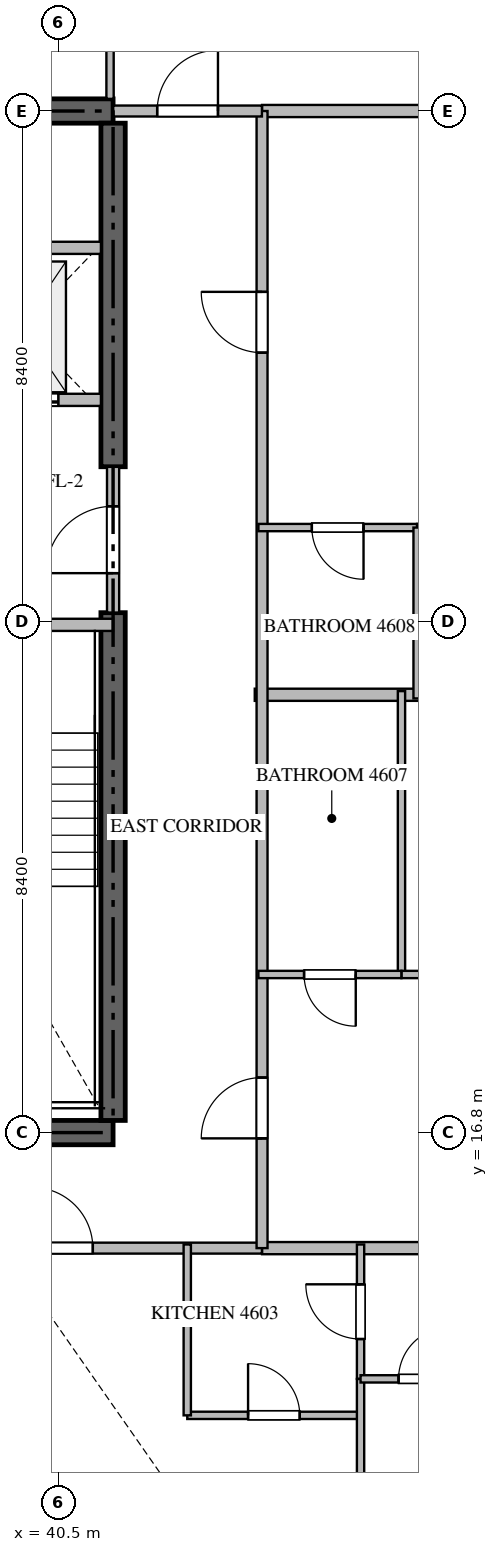
"""IFC4 building model, lengths in metres.
Left out: names, types, materials, properties, quantities, classifications, styles, units other than length and angle.
Written with IfcOpenShell. Run it as: python <this file> out.ifc"""

import sys

from ifc_helpers import new_model, si_unit, direction, frame, frame_2d, origin, place, context, subcontext, project, spatial, rectangle, extrude, source, transform, mapped, element, fill, save


model = new_model("IFC4")
c1 = context("Model", 3, precision=1e-05, world=origin(), true_north=direction((0.0, 1.0)))
c2 = subcontext(c1, "Body", "Model", "MODEL_VIEW")
j1 = project(units=[si_unit("LENGTHUNIT", "METRE"), si_unit("PLANEANGLEUNIT", "RADIAN")], contexts=[c1])
p1 = place(None, origin())
s1 = spatial("IfcSite", under=j1, at=p1, CompositionType="ELEMENT")
p2 = place(p1, origin())
s2 = spatial("IfcBuilding", under=s1, at=p2, CompositionType="ELEMENT")
p3 = place(p2, frame((0.0, 0.0, 183.9)))
s3 = spatial("IfcBuildingStorey", under=s2, at=p3, CompositionType="ELEMENT", Elevation=183.9)
for number, where, z_axis, x_axis in (
    (1, (23.4, 16.8, -0.26), (0.0, 0.0, 1.0), (1.0, 0.0, 0.0)),
    (2, (41.4, 33.6, -0.26), (0.0, 0.0, 1.0), (-1.0, 0.0, 0.0)),
):
    element("IfcWall", number, at=place(p3, frame(where, z_axis=z_axis, x_axis=x_axis)), inside=s3, PredefinedType="SHEAR", context=c2, shape_type="SweptSolid", body=[
        extrude(rectangle(XDim=18.0, YDim=0.4, at=frame_2d((9.0, 0.0))), origin(), (0.0, 0.0, 1.0), 3.748),
    ])
p4 = place(p3, frame((41.4, 17.0, -0.26), z_axis=(0.0, 0.0, 1.0), x_axis=(0.0, 1.0, 0.0)))
e3 = element("IfcWall", 3, at=p4, inside=s3, PredefinedType="SHEAR", context=c2, shape_type="SweptSolid", body=[
    extrude(rectangle(XDim=8.35, YDim=0.4, at=frame_2d((4.175, 0.0))), origin(), (0.0, 0.0, 1.0), 3.748),
])
p5 = place(p3, frame((41.4, 27.75, -0.26), z_axis=(0.0, 0.0, 1.0), x_axis=(0.0, 1.0, 0.0)))
e4 = element("IfcWall", 4, at=p5, inside=s3, PredefinedType="SHEAR", context=c2, shape_type="SweptSolid", body=[
    extrude(rectangle(XDim=5.65, YDim=0.4, at=frame_2d((2.825, 0.0))), origin(), (0.0, 0.0, 1.0), 3.748),
])
p6 = place(p3, frame((36.95, 25.15, 0.0), z_axis=(0.0, 0.0, 1.0), x_axis=(1.0, 0.0, 0.0)))
e5 = element("IfcWall", 5, at=p6, inside=s3, PredefinedType="STANDARD", context=c2, shape_type="SweptSolid", body=[
    extrude(rectangle(XDim=4.45, YDim=0.2, at=frame_2d((2.225, 0.0))), origin(), (0.0, 0.0, 1.0), 3.49),
])
p7 = place(p6, frame((1.65, 0.0, 0.0)))
e6 = element("IfcOpeningElement", 6, at=p7, cuts=e5, PredefinedType="OPENING", context=c2, shape_type="SweptSolid", body=[
    extrude(rectangle(XDim=1.1, YDim=2.15, at=frame_2d((0.55, 1.075))), frame((0.0, 0.11, 0.0), z_axis=(0.0, -1.0, 0.0), x_axis=(1.0, 0.0, 0.0)), (0.0, 0.0, 1.0), 0.22),
])
p8 = place(p3, frame((38.75, 28.85, 0.0), z_axis=(0.0, 0.0, 1.0), x_axis=(1.0, 0.0, 0.0)))
e7 = element("IfcWall", 7, at=p8, inside=s3, PredefinedType="STANDARD", context=c2, shape_type="SweptSolid", body=[
    extrude(rectangle(XDim=2.45, YDim=0.2, at=frame_2d((1.225, 0.0))), origin(), (0.0, 0.0, 1.0), 3.49),
])
p9 = place(p8, frame((0.55, 0.0, 0.0)))
e8 = element("IfcOpeningElement", 8, at=p9, cuts=e7, PredefinedType="OPENING", context=c2, shape_type="SweptSolid", body=[
    extrude(rectangle(XDim=1.2, YDim=2.2, at=frame_2d((0.6, 1.1))), frame((0.0, 0.11, 0.0), z_axis=(0.0, -1.0, 0.0), x_axis=(1.0, 0.0, 0.0)), (0.0, 0.0, 1.0), 0.22),
])
p10 = place(p3, frame((38.75, 31.35, 0.0), z_axis=(0.0, 0.0, 1.0), x_axis=(1.0, 0.0, 0.0)))
e9 = element("IfcWall", 9, at=p10, inside=s3, PredefinedType="STANDARD", context=c2, shape_type="SweptSolid", body=[
    extrude(rectangle(XDim=2.45, YDim=0.2, at=frame_2d((1.225, 0.0))), origin(), (0.0, 0.0, 1.0), 3.49),
])
p11 = place(p3, frame((41.4, 25.352, 0.0), z_axis=(0.0, 0.0, 1.0), x_axis=(0.0, 1.0, 0.0)))
e10 = element("IfcWall", 10, at=p11, inside=s3, PredefinedType="STANDARD", context=c2, shape_type="SweptSolid", body=[
    extrude(rectangle(XDim=2.396, YDim=0.2, at=frame_2d((1.198, 0.0))), origin(), (0.0, 0.0, 1.0), 3.49),
])
p12 = place(p11, frame((0.648, 0.0, 0.0)))
e11 = element("IfcOpeningElement", 11, at=p12, cuts=e10, PredefinedType="OPENING", context=c2, shape_type="SweptSolid", body=[
    extrude(rectangle(XDim=1.1, YDim=2.15, at=frame_2d((0.55, 1.075))), frame((0.0, 0.11, 0.0), z_axis=(0.0, -1.0, 0.0), x_axis=(1.0, 0.0, 0.0)), (0.0, 0.0, 1.0), 0.22),
])
p13 = place(p3, frame((43.73, 24.0, 0.0), z_axis=(0.0, 0.0, 1.0), x_axis=(1.0, 0.0, 0.0)))
e12 = element("IfcWall", 12, at=p13, inside=s3, PredefinedType="PARTITIONING", context=c2, shape_type="SweptSolid", body=[
    extrude(rectangle(XDim=13.188, YDim=0.2, at=frame_2d((6.594, 0.0))), origin(), (0.0, 0.0, 1.0), 3.49),
])
for number, where, z_axis, x_axis in (
    (13, (43.85, 14.9, 0.0), (0.0, 0.0, 1.0), (1.0, 0.0, 0.0)),
    (14, (43.85, 33.6, 0.0), (0.0, 0.0, 1.0), (1.0, 0.0, 0.0)),
):
    element("IfcWall", number, at=place(p3, frame(where, z_axis=z_axis, x_axis=x_axis)), inside=s3, PredefinedType="PARTITIONING", context=c2, shape_type="SweptSolid", body=[
        extrude(rectangle(XDim=13.068, YDim=0.2, at=frame_2d((6.534, 0.0))), origin(), (0.0, 0.0, 1.0), 3.49),
    ])
p14 = place(p3, frame((20.952, 14.9, 0.0), z_axis=(0.0, 0.0, 1.0), x_axis=(1.0, 0.0, 0.0)))
e15 = element("IfcWall", 15, at=p14, inside=s3, PredefinedType="PARTITIONING", context=c2, shape_type="SweptSolid", body=[
    extrude(rectangle(XDim=22.896, YDim=0.18, at=frame_2d((11.448, 0.0))), origin(), (0.0, 0.0, 1.0), 3.49),
])
p15 = place(p14, frame((2.781, 0.0, 0.0)))
e16 = element("IfcOpeningElement", 16, at=p15, cuts=e15, PredefinedType="OPENING", context=c2, shape_type="SweptSolid", body=[
    extrude(rectangle(XDim=1.0, YDim=2.15, at=frame_2d((0.5, 1.075))), frame((0.0, 0.1, 0.0), z_axis=(0.0, -1.0, 0.0), x_axis=(1.0, 0.0, 0.0)), (0.0, 0.0, 1.0), 0.2),
])
p16 = place(p14, frame((14.736, 0.0, 0.0)))
e17 = element("IfcOpeningElement", 17, at=p16, cuts=e15, PredefinedType="OPENING", context=c2, shape_type="SweptSolid", body=[
    extrude(rectangle(XDim=1.0, YDim=2.15, at=frame_2d((0.5, 1.075))), frame((0.0, 0.1, 0.0), z_axis=(0.0, -1.0, 0.0), x_axis=(1.0, 0.0, 0.0)), (0.0, 0.0, 1.0), 0.2),
])
p17 = place(p14, frame((19.115, 0.0, 0.0)))
e18 = element("IfcOpeningElement", 18, at=p17, cuts=e15, PredefinedType="OPENING", context=c2, shape_type="SweptSolid", body=[
    extrude(rectangle(XDim=1.0, YDim=2.15, at=frame_2d((0.5, 1.075))), frame((0.0, 0.1, 0.0), z_axis=(0.0, -1.0, 0.0), x_axis=(1.0, 0.0, 0.0)), (0.0, 0.0, 1.0), 0.2),
])
p18 = place(p3, frame((43.85, 14.9, 0.0), z_axis=(0.0, 0.0, 1.0), x_axis=(0.0, 1.0, 0.0)))
e19 = element("IfcWall", 19, at=p18, inside=s3, PredefinedType="PARTITIONING", context=c2, shape_type="SweptSolid", body=[
    extrude(rectangle(XDim=18.7, YDim=0.18, at=frame_2d((9.35, 0.0))), origin(), (0.0, 0.0, 1.0), 3.49),
])
p19 = place(p18, frame((1.805, 0.0, 0.0)))
e20 = element("IfcOpeningElement", 20, at=p19, cuts=e19, PredefinedType="OPENING", context=c2, shape_type="SweptSolid", body=[
    extrude(rectangle(XDim=1.0, YDim=2.15, at=frame_2d((0.5, 1.075))), frame((0.0, 0.1, 0.0), z_axis=(0.0, -1.0, 0.0), x_axis=(1.0, 0.0, 0.0)), (0.0, 0.0, 1.0), 0.2),
])
p20 = place(p18, frame((14.726, 0.0, 0.0)))
e21 = element("IfcOpeningElement", 21, at=p20, cuts=e19, PredefinedType="OPENING", context=c2, shape_type="SweptSolid", body=[
    extrude(rectangle(XDim=1.0, YDim=2.15, at=frame_2d((0.5, 1.075))), frame((0.0, 0.1, 0.0), z_axis=(0.0, -1.0, 0.0), x_axis=(1.0, 0.0, 0.0)), (0.0, 0.0, 1.0), 0.2),
])
p21 = place(p3, frame((41.402, 33.6, 0.0), z_axis=(0.0, 0.0, 1.0), x_axis=(1.0, 0.0, 0.0)))
e22 = element("IfcWall", 22, at=p21, inside=s3, PredefinedType="PARTITIONING", context=c2, shape_type="SweptSolid", body=[
    extrude(rectangle(XDim=2.446, YDim=0.18, at=frame_2d((1.223, 0.0))), origin(), (0.0, 0.0, 1.0), 3.49),
])
p22 = place(p21, frame((0.723, 0.0, 0.0)))
e23 = element("IfcOpeningElement", 23, at=p22, cuts=e22, PredefinedType="OPENING", context=c2, shape_type="SweptSolid", body=[
    extrude(rectangle(XDim=1.0, YDim=2.15, at=frame_2d((0.5, 1.075))), frame((0.0, 0.1, 0.0), z_axis=(0.0, -1.0, 0.0), x_axis=(1.0, 0.0, 0.0)), (0.0, 0.0, 1.0), 0.2),
])
p23 = place(p3, frame((42.62, 12.15, 0.0), z_axis=(0.0, 0.0, 1.0), x_axis=(1.0, 0.0, 0.0)))
e24 = element("IfcWall", 24, at=p23, inside=s3, PredefinedType="PARTITIONING", context=c2, shape_type="SweptSolid", body=[
    extrude(rectangle(XDim=2.85, YDim=0.12, at=frame_2d((1.425, 0.0))), origin(), (0.0, 0.0, 1.0), 3.49),
])
p24 = place(p23, frame((1.0, 0.0, 0.0)))
e25 = element("IfcOpeningElement", 25, at=p24, cuts=e24, PredefinedType="OPENING", context=c2, shape_type="SweptSolid", body=[
    extrude(rectangle(XDim=0.85, YDim=2.1, at=frame_2d((0.425, 1.05))), frame((0.0, 0.07, 0.0), z_axis=(0.0, -1.0, 0.0), x_axis=(1.0, 0.0, 0.0)), (0.0, 0.0, 1.0), 0.14),
])
p25 = place(p3, frame((42.62, 12.15, 0.0), z_axis=(0.0, 0.0, 1.0), x_axis=(0.0, 1.0, 0.0)))
e26 = element("IfcWall", 26, at=p25, inside=s3, PredefinedType="PARTITIONING", context=c2, shape_type="SweptSolid", body=[
    extrude(rectangle(XDim=2.81, YDim=0.12, at=frame_2d((1.405, 0.0))), origin(), (0.0, 0.0, 1.0), 3.49),
])
p26 = place(p3, frame((45.47, 12.75, 0.0), z_axis=(0.0, 0.0, 1.0), x_axis=(0.0, 1.0, 0.0)))
e27 = element("IfcWall", 27, at=p26, inside=s3, PredefinedType="PARTITIONING", context=c2, shape_type="SweptSolid", body=[
    extrude(rectangle(XDim=2.21, YDim=0.12, at=frame_2d((1.105, 0.0))), origin(), (0.0, 0.0, 1.0), 3.49),
])
p27 = place(p26, frame((0.655, 0.0, 0.0)))
e28 = element("IfcOpeningElement", 28, at=p27, cuts=e27, PredefinedType="OPENING", context=c2, shape_type="SweptSolid", body=[
    extrude(rectangle(XDim=0.9, YDim=2.1, at=frame_2d((0.45, 1.05))), frame((0.0, 0.07, 0.0), z_axis=(0.0, -1.0, 0.0), x_axis=(1.0, 0.0, 0.0)), (0.0, 0.0, 1.0), 0.14),
])
p28 = place(p3, frame((45.47, 6.795, 0.0), z_axis=(0.0, 0.0, 1.0), x_axis=(0.0, 1.0, 0.0)))
e29 = element("IfcWall", 29, at=p28, inside=s3, PredefinedType="PARTITIONING", context=c2, shape_type="SweptSolid", body=[
    extrude(rectangle(XDim=5.953, YDim=0.12, at=frame_2d((2.977, 0.0))), origin(), (0.0, 0.0, 1.0), 3.49),
])
p29 = place(p3, frame((45.47, 12.75, 0.0), z_axis=(0.0, 0.0, 1.0), x_axis=(1.0, 0.0, 0.0)))
e30 = element("IfcWall", 30, at=p29, inside=s3, PredefinedType="PARTITIONING", context=c2, shape_type="SweptSolid", body=[
    extrude(rectangle(XDim=2.1, YDim=0.12, at=frame_2d((1.05, 0.0))), origin(), (0.0, 0.0, 1.0), 3.49),
])
p30 = place(p29, frame((0.625, 0.0, 0.0)))
e31 = element("IfcOpeningElement", 31, at=p30, cuts=e30, PredefinedType="OPENING", context=c2, shape_type="SweptSolid", body=[
    extrude(rectangle(XDim=0.85, YDim=2.1, at=frame_2d((0.425, 1.05))), frame((0.0, 0.07, 0.0), z_axis=(0.0, -1.0, 0.0), x_axis=(1.0, 0.0, 0.0)), (0.0, 0.0, 1.0), 0.14),
])
p31 = place(p3, frame((41.35, 36.35, 0.0), z_axis=(0.0, 0.0, 1.0), x_axis=(0.0, -1.0, 0.0)))
e32 = element("IfcWall", 32, at=p31, inside=s3, PredefinedType="PARTITIONING", context=c2, shape_type="SweptSolid", body=[
    extrude(rectangle(XDim=2.55, YDim=0.12, at=frame_2d((1.275, 0.0))), origin(), (0.0, 0.0, 1.0), 3.49),
])
p32 = place(p3, frame((46.143, 19.4, 0.0), z_axis=(0.0, 0.0, 1.0), x_axis=(0.0, 1.0, 0.0)))
e33 = element("IfcWall", 33, at=p32, inside=s3, PredefinedType="PARTITIONING", context=c2, shape_type="SweptSolid", body=[
    extrude(rectangle(XDim=4.66, YDim=0.12, at=frame_2d((2.33, 0.0))), origin(), (0.0, 0.0, 1.0), 3.49),
])
p33 = place(p3, frame((48.952, 19.4, 0.0), z_axis=(0.0, 0.0, 1.0), x_axis=(-1.0, 0.0, 0.0)))
e34 = element("IfcWall", 34, at=p33, inside=s3, PredefinedType="PARTITIONING", context=c2, shape_type="SweptSolid", body=[
    extrude(rectangle(XDim=2.809, YDim=0.12, at=frame_2d((1.404, 0.0))), origin(), (0.0, 0.0, 1.0), 3.49),
])
p34 = place(p33, frame((0.979, 0.0, 0.0)))
e35 = element("IfcOpeningElement", 35, at=p34, cuts=e34, PredefinedType="OPENING", context=c2, shape_type="SweptSolid", body=[
    extrude(rectangle(XDim=0.85, YDim=2.1, at=frame_2d((0.425, 1.05))), frame((0.0, 0.07, 0.0), z_axis=(0.0, -1.0, 0.0), x_axis=(1.0, 0.0, 0.0)), (0.0, 0.0, 1.0), 0.14),
])
p35 = place(p3, frame((46.141, 19.4, 0.0), z_axis=(0.0, 0.0, 1.0), x_axis=(-1.0, 0.0, 0.0)))
e36 = element("IfcWall", 36, at=p35, inside=s3, PredefinedType="PARTITIONING", context=c2, shape_type="SweptSolid", body=[
    extrude(rectangle(XDim=2.351, YDim=0.12, at=frame_2d((1.176, 0.0))), origin(), (0.0, 0.0, 1.0), 3.49),
])
p36 = place(p35, frame((0.75, 0.0, 0.0)))
e37 = element("IfcOpeningElement", 37, at=p36, cuts=e36, PredefinedType="OPENING", context=c2, shape_type="SweptSolid", body=[
    extrude(rectangle(XDim=0.85, YDim=2.1, at=frame_2d((0.425, 1.05))), frame((0.0, 0.07, 0.0), z_axis=(0.0, -1.0, 0.0), x_axis=(1.0, 0.0, 0.0)), (0.0, 0.0, 1.0), 0.14),
])
p37 = place(p3, frame((49.0, 26.75, 0.0), z_axis=(0.0, 0.0, 1.0), x_axis=(-1.0, 0.0, 0.0)))
e38 = element("IfcWall", 38, at=p37, inside=s3, PredefinedType="PARTITIONING", context=c2, shape_type="SweptSolid", body=[
    extrude(rectangle(XDim=2.6, YDim=0.12, at=frame_2d((1.3, 0.0))), origin(), (0.0, 0.0, 1.0), 3.49),
])
p38 = place(p37, frame((0.875, 0.0, 0.0)))
e39 = element("IfcOpeningElement", 39, at=p38, cuts=e38, PredefinedType="OPENING", context=c2, shape_type="SweptSolid", body=[
    extrude(rectangle(XDim=0.85, YDim=2.1, at=frame_2d((0.425, 1.05))), frame((0.0, 0.07, 0.0), z_axis=(0.0, -1.0, 0.0), x_axis=(1.0, 0.0, 0.0)), (0.0, 0.0, 1.0), 0.14),
])
p39 = place(p3, frame((46.398, 26.75, 0.0), z_axis=(0.0, 0.0, 1.0), x_axis=(-1.0, 0.0, 0.0)))
e40 = element("IfcWall", 40, at=p39, inside=s3, PredefinedType="PARTITIONING", context=c2, shape_type="SweptSolid", body=[
    extrude(rectangle(XDim=2.608, YDim=0.12, at=frame_2d((1.304, 0.0))), origin(), (0.0, 0.0, 1.0), 3.49),
])
p40 = place(p39, frame((0.879, 0.0, 0.0)))
e41 = element("IfcOpeningElement", 41, at=p40, cuts=e40, PredefinedType="OPENING", context=c2, shape_type="SweptSolid", body=[
    extrude(rectangle(XDim=0.85, YDim=2.1, at=frame_2d((0.425, 1.05))), frame((0.0, 0.07, 0.0), z_axis=(0.0, -1.0, 0.0), x_axis=(1.0, 0.0, 0.0)), (0.0, 0.0, 1.0), 0.14),
])
p41 = place(p3, frame((46.4, 23.94, 0.0), z_axis=(0.0, 0.0, 1.0), x_axis=(0.0, 1.0, 0.0)))
e42 = element("IfcWall", 42, at=p41, inside=s3, PredefinedType="PARTITIONING", context=c2, shape_type="SweptSolid", body=[
    extrude(rectangle(XDim=2.81, YDim=0.12, at=frame_2d((1.405, 0.0))), origin(), (0.0, 0.0, 1.0), 3.49),
])
m1 = source(origin(), c2, "Body", "SweptSolid", [
    extrude(rectangle(XDim=1.2, YDim=2.2, at=frame_2d((0.6, 1.1))), frame((0.0, 0.025, 0.0), z_axis=(0.0, -1.0, 0.0), x_axis=(1.0, 0.0, 0.0)), (0.0, 0.0, 1.0), 0.05),
])
p42 = place(p9, origin())
e43 = element("IfcDoor", 43, at=p42, inside=s3, OperationType="DOUBLE_DOOR_SLIDING", PredefinedType="DOOR", context=c2, shape_type="MappedRepresentation", body=[
    mapped(m1, transform((0.0, 0.0, 0.0), scale=1.0)),
])
fill(e8, e43)
m2 = source(origin(), c2, "Body", "SweptSolid", [
    extrude(rectangle(XDim=1.1, YDim=2.15, at=frame_2d((0.55, 1.075))), frame((0.0, 0.025, 0.0), z_axis=(0.0, -1.0, 0.0), x_axis=(1.0, 0.0, 0.0)), (0.0, 0.0, 1.0), 0.05),
])
p43 = place(p12, origin())
e44 = element("IfcDoor", 44, at=p43, inside=s3, OperationType="SINGLE_SWING_LEFT", PredefinedType="DOOR", context=c2, shape_type="MappedRepresentation", body=[
    mapped(m2, transform((0.0, 0.0, 0.0), scale=1.0)),
])
fill(e11, e44)
m3 = source(origin(), c2, "Body", "SweptSolid", [
    extrude(rectangle(XDim=1.0, YDim=2.15, at=frame_2d((0.5, 1.075))), frame((0.0, 0.025, 0.0), z_axis=(0.0, -1.0, 0.0), x_axis=(1.0, 0.0, 0.0)), (0.0, 0.0, 1.0), 0.05),
])
p44 = place(p17, origin())
e45 = element("IfcDoor", 45, at=p44, inside=s3, OperationType="SINGLE_SWING_LEFT", PredefinedType="DOOR", context=c2, shape_type="MappedRepresentation", body=[
    mapped(m3, transform((0.0, 0.0, 0.0), scale=1.0)),
])
fill(e18, e45)
p45 = place(p19, origin())
e46 = element("IfcDoor", 46, at=p45, inside=s3, OperationType="SINGLE_SWING_LEFT", PredefinedType="DOOR", context=c2, shape_type="MappedRepresentation", body=[
    mapped(m3, transform((0.0, 0.0, 0.0), scale=1.0)),
])
fill(e20, e46)
p46 = place(p20, origin())
e47 = element("IfcDoor", 47, at=p46, inside=s3, OperationType="SINGLE_SWING_RIGHT", PredefinedType="DOOR", context=c2, shape_type="MappedRepresentation", body=[
    mapped(m3, transform((0.0, 0.0, 0.0), scale=1.0)),
])
fill(e21, e47)
p47 = place(p22, origin())
e48 = element("IfcDoor", 48, at=p47, inside=s3, OperationType="SINGLE_SWING_RIGHT", PredefinedType="DOOR", context=c2, shape_type="MappedRepresentation", body=[
    mapped(m3, transform((0.0, 0.0, 0.0), scale=1.0)),
])
fill(e23, e48)
m4 = source(origin(), c2, "Body", "SweptSolid", [
    extrude(rectangle(XDim=0.85, YDim=2.1, at=frame_2d((0.425, 1.05))), frame((0.0, 0.025, 0.0), z_axis=(0.0, -1.0, 0.0), x_axis=(1.0, 0.0, 0.0)), (0.0, 0.0, 1.0), 0.05),
])
p48 = place(p24, origin())
e49 = element("IfcDoor", 49, at=p48, inside=s3, OperationType="SINGLE_SWING_LEFT", PredefinedType="DOOR", context=c2, shape_type="MappedRepresentation", body=[
    mapped(m4, transform((0.0, 0.0, 0.0), scale=1.0)),
])
fill(e25, e49)
m5 = source(origin(), c2, "Body", "SweptSolid", [
    extrude(rectangle(XDim=0.9, YDim=2.1, at=frame_2d((0.45, 1.05))), frame((0.0, 0.025, 0.0), z_axis=(0.0, -1.0, 0.0), x_axis=(1.0, 0.0, 0.0)), (0.0, 0.0, 1.0), 0.05),
])
p49 = place(p27, origin())
e50 = element("IfcDoor", 50, at=p49, inside=s3, OperationType="SINGLE_SWING_RIGHT", PredefinedType="DOOR", context=c2, shape_type="MappedRepresentation", body=[
    mapped(m5, transform((0.0, 0.0, 0.0), scale=1.0)),
])
fill(e28, e50)
p50 = place(p30, origin())
e51 = element("IfcDoor", 51, at=p50, inside=s3, OperationType="SINGLE_SWING_RIGHT", PredefinedType="DOOR", context=c2, shape_type="MappedRepresentation", body=[
    mapped(m4, transform((0.0, 0.0, 0.0), scale=1.0)),
])
fill(e31, e51)
p51 = place(p36, origin())
e52 = element("IfcDoor", 52, at=p51, inside=s3, OperationType="SINGLE_SWING_LEFT", PredefinedType="DOOR", context=c2, shape_type="MappedRepresentation", body=[
    mapped(m4, transform((0.0, 0.0, 0.0), scale=1.0)),
])
fill(e37, e52)
p52 = place(p40, origin())
e53 = element("IfcDoor", 53, at=p52, inside=s3, OperationType="SINGLE_SWING_LEFT", PredefinedType="DOOR", context=c2, shape_type="MappedRepresentation", body=[
    mapped(m4, transform((0.0, 0.0, 0.0), scale=1.0)),
])
fill(e41, e53)
save(model, sys.argv[1])
